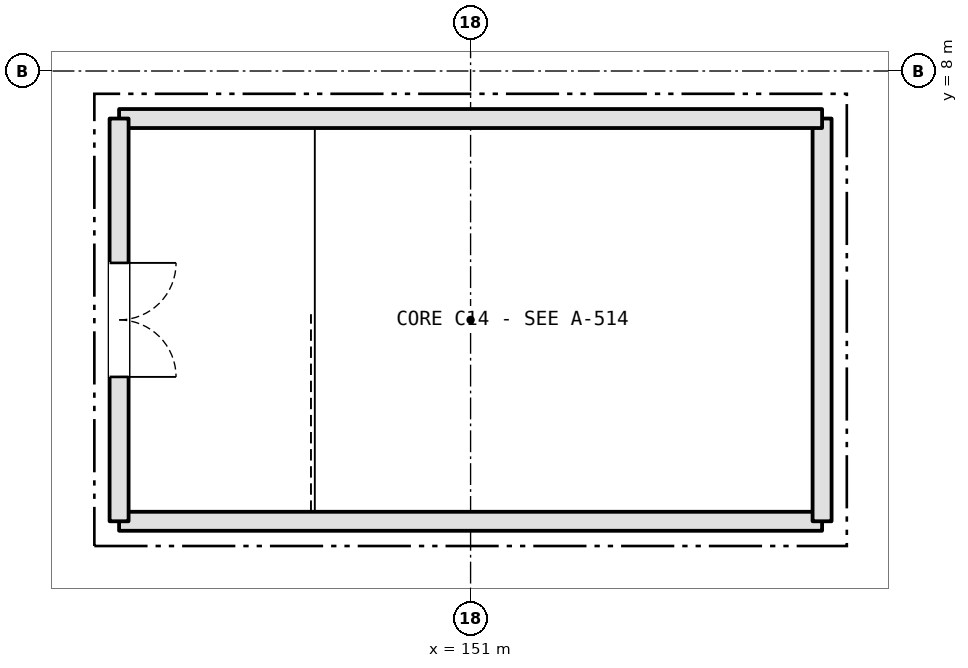
"""IFC4 building model, lengths in metres.
Left out: names, types, materials, properties, quantities, classifications, styles, units other than length and angle.
Written with IfcOpenShell. Run it as: python <this file> out.ifc"""

import sys

from ifc_helpers import new_model, si_unit, direction, frame, frame_2d, origin, place, context, subcontext, project, spatial, rectangle, extrude, element, fill, save


model = new_model("IFC4")
c1 = context("Model", 3, precision=1e-05, world=origin(), true_north=direction((0.0, 1.0)))
c2 = subcontext(c1, "Body", "Model", "MODEL_VIEW")
j1 = project(units=[si_unit("LENGTHUNIT", "METRE"), si_unit("PLANEANGLEUNIT", "RADIAN")], contexts=[c1])
p1 = place(None, origin())
s1 = spatial("IfcSite", under=j1, at=p1, CompositionType="ELEMENT")
p2 = place(p1, origin())
s2 = spatial("IfcBuilding", under=s1, at=p2, CompositionType="ELEMENT")
p3 = place(p2, frame((0.0, 0.0, 21.6)))
s3 = spatial("IfcBuildingStorey", under=s2, at=p3, CompositionType="ELEMENT", Elevation=21.6)
p4 = place(p3, frame((146.375, 2.075, 0.0), z_axis=(0.0, 0.0, 1.0), x_axis=(1.0, 0.0, 0.0)))
e1 = element("IfcWall", 1, at=p4, inside=s3, PredefinedType="SHEAR", context=c2, shape_type="SweptSolid", body=[
    extrude(rectangle(XDim=9.249, YDim=0.25, at=frame_2d((4.625, 0.0))), origin(), (0.0, 0.0, 1.0), 5.15),
])
p5 = place(p3, frame((155.625, 2.075, 0.0), z_axis=(0.0, 0.0, 1.0), x_axis=(0.0, 1.0, 0.0)))
e2 = element("IfcWall", 2, at=p5, inside=s3, PredefinedType="SHEAR", context=c2, shape_type="SweptSolid", body=[
    extrude(rectangle(XDim=5.299, YDim=0.25, at=frame_2d((2.649, 0.0))), origin(), (0.0, 0.0, 1.0), 5.15),
])
p6 = place(p3, frame((155.625, 7.375, 0.0), z_axis=(0.0, 0.0, 1.0), x_axis=(-1.0, 0.0, 0.0)))
e3 = element("IfcWall", 3, at=p6, inside=s3, PredefinedType="SHEAR", context=c2, shape_type="SweptSolid", body=[
    extrude(rectangle(XDim=9.249, YDim=0.25, at=frame_2d((4.625, 0.0))), origin(), (0.0, 0.0, 1.0), 5.15),
])
p7 = place(p3, frame((146.375, 7.375, 0.0), z_axis=(0.0, 0.0, 1.0), x_axis=(0.0, -1.0, 0.0)))
e4 = element("IfcWall", 4, at=p7, inside=s3, PredefinedType="SHEAR", context=c2, shape_type="SweptSolid", body=[
    extrude(rectangle(XDim=5.299, YDim=0.25, at=frame_2d((2.649, 0.0))), origin(), (0.0, 0.0, 1.0), 5.15),
])
p8 = place(p7, frame((1.9, 0.0, 0.0)))
e5 = element("IfcOpeningElement", 5, at=p8, cuts=e4, PredefinedType="OPENING", context=c2, shape_type="SweptSolid", body=[
    extrude(rectangle(XDim=1.5, YDim=2.2, at=frame_2d((0.75, 1.1))), frame((0.0, 0.135, 0.0), z_axis=(0.0, -1.0, 0.0), x_axis=(1.0, 0.0, 0.0)), (0.0, 0.0, 1.0), 0.27),
])
p9 = place(p8, origin())
e6 = element("IfcDoor", 6, at=p9, inside=s3, OperationType="DOUBLE_DOOR_SINGLE_SWING", PredefinedType="DOOR", context=c2, shape_type="SweptSolid", body=[
    extrude(rectangle(XDim=1.5, YDim=2.2, at=frame_2d((0.75, 1.1))), frame((0.0, 0.025, 0.0), z_axis=(0.0, -1.0, 0.0), x_axis=(1.0, 0.0, 0.0)), (0.0, 0.0, 1.0), 0.05),
])
fill(e5, e6)
save(model, sys.argv[1])
